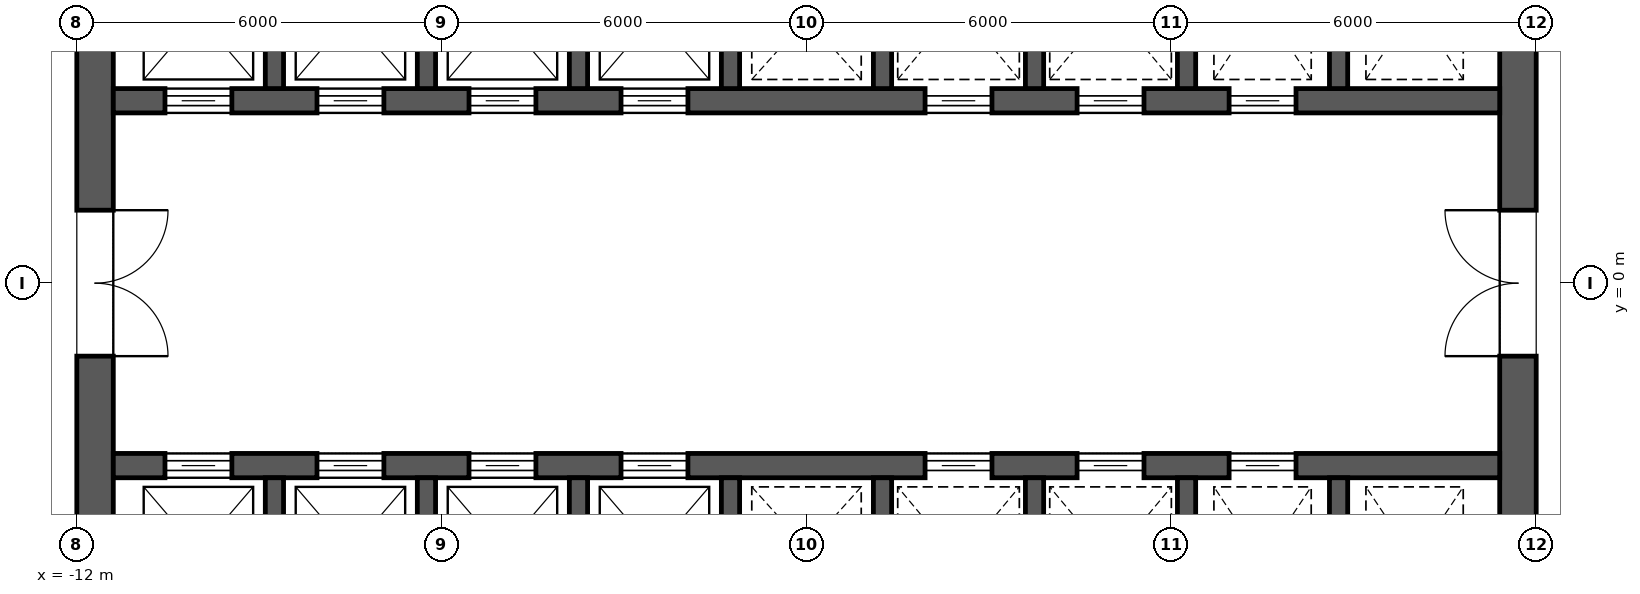
"""IFC4 building model, lengths in metres.
Left out: names, types, materials, properties, quantities, classifications, styles, units other than length and angle.
Written with IfcOpenShell. Run it as: python <this file> out.ifc"""

import sys

from ifc_helpers import new_model, si_unit, direction, frame, frame_2d, origin, place, context, subcontext, project, spatial, rectangle, extrude, element, fill, save


model = new_model("IFC4")
c1 = context("Model", 3, precision=1e-05, world=origin(), true_north=direction((0.0, 1.0)))
c2 = subcontext(c1, "Body", "Model", "MODEL_VIEW")
j1 = project(units=[si_unit("LENGTHUNIT", "METRE"), si_unit("PLANEANGLEUNIT", "RADIAN")], contexts=[c1])
p1 = place(None, origin())
s1 = spatial("IfcSite", under=j1, at=p1, CompositionType="ELEMENT")
p2 = place(p1, origin())
s2 = spatial("IfcBuilding", under=s1, at=p2, CompositionType="ELEMENT")
p3 = place(p2, frame((0.0, 0.0, 167.5)))
s3 = spatial("IfcBuildingStorey", under=s2, at=p3, CompositionType="ELEMENT", Elevation=167.5)
p4 = place(p3, frame((11.7, -11.4, 0.0), z_axis=(0.0, 0.0, 1.0), x_axis=(0.0, 1.0, 0.0)))
e1 = element("IfcWall", 1, at=p4, inside=s3, PredefinedType="SHEAR", context=c2, shape_type="SweptSolid", body=[
    extrude(rectangle(XDim=22.8, YDim=0.6, at=frame_2d((11.4, 0.0))), origin(), (0.0, 0.0, 1.0), 6.0),
])
p5 = place(p4, frame((10.2, 0.0, 0.0)))
e2 = element("IfcOpeningElement", 2, at=p5, cuts=e1, PredefinedType="OPENING", context=c2, shape_type="SweptSolid", body=[
    extrude(rectangle(XDim=2.4, YDim=2.1, at=frame_2d((1.2, 1.05))), frame((0.0, 0.312, 0.0), z_axis=(0.0, -1.0, 0.0), x_axis=(1.0, 0.0, 0.0)), (0.0, 0.0, 1.0), 0.624),
])
p6 = place(p4, frame((19.5, 0.0, 0.0)))
e3 = element("IfcOpeningElement", 3, at=p6, cuts=e1, PredefinedType="OPENING", context=c2, shape_type="SweptSolid", body=[
    extrude(rectangle(XDim=1.2, YDim=2.1, at=frame_2d((0.6, 1.05))), frame((0.0, 0.312, 0.0), z_axis=(0.0, -1.0, 0.0), x_axis=(1.0, 0.0, 0.0)), (0.0, 0.0, 1.0), 0.624),
])
p7 = place(p4, frame((2.1, 0.0, 0.0)))
e4 = element("IfcOpeningElement", 4, at=p7, cuts=e1, PredefinedType="OPENING", context=c2, shape_type="SweptSolid", body=[
    extrude(rectangle(XDim=1.2, YDim=2.1, at=frame_2d((0.6, 1.05))), frame((0.0, 0.312, 0.0), z_axis=(0.0, -1.0, 0.0), x_axis=(1.0, 0.0, 0.0)), (0.0, 0.0, 1.0), 0.624),
])
p8 = place(p3, frame((-11.7, -11.4, 0.0), z_axis=(0.0, 0.0, 1.0), x_axis=(0.0, 1.0, 0.0)))
e5 = element("IfcWall", 5, at=p8, inside=s3, PredefinedType="SHEAR", context=c2, shape_type="SweptSolid", body=[
    extrude(rectangle(XDim=22.8, YDim=0.6, at=frame_2d((11.4, 0.0))), origin(), (0.0, 0.0, 1.0), 6.0),
])
p9 = place(p8, frame((10.2, 0.0, 0.0)))
e6 = element("IfcOpeningElement", 6, at=p9, cuts=e5, PredefinedType="OPENING", context=c2, shape_type="SweptSolid", body=[
    extrude(rectangle(XDim=2.4, YDim=2.1, at=frame_2d((1.2, 1.05))), frame((0.0, 0.312, 0.0), z_axis=(0.0, -1.0, 0.0), x_axis=(1.0, 0.0, 0.0)), (0.0, 0.0, 1.0), 0.624),
])
p10 = place(p8, frame((18.925, 0.0, 0.0)))
e7 = element("IfcOpeningElement", 7, at=p10, cuts=e5, PredefinedType="OPENING", context=c2, shape_type="SweptSolid", body=[
    extrude(rectangle(XDim=1.2, YDim=2.1, at=frame_2d((0.6, 1.05))), frame((0.0, 0.312, 0.0), z_axis=(0.0, -1.0, 0.0), x_axis=(1.0, 0.0, 0.0)), (0.0, 0.0, 1.0), 0.624),
])
p11 = place(p8, frame((2.675, 0.0, 0.0)))
e8 = element("IfcOpeningElement", 8, at=p11, cuts=e5, PredefinedType="OPENING", context=c2, shape_type="SweptSolid", body=[
    extrude(rectangle(XDim=1.2, YDim=2.1, at=frame_2d((0.6, 1.05))), frame((0.0, 0.312, 0.0), z_axis=(0.0, -1.0, 0.0), x_axis=(1.0, 0.0, 0.0)), (0.0, 0.0, 1.0), 0.624),
])
p12 = place(p3, frame((-11.4, 3.0, 0.0), z_axis=(0.0, 0.0, 1.0), x_axis=(1.0, 0.0, 0.0)))
e9 = element("IfcWall", 9, at=p12, inside=s3, PredefinedType="SHEAR", context=c2, shape_type="SweptSolid", body=[
    extrude(rectangle(XDim=22.8, YDim=0.4, at=frame_2d((11.4, 0.0))), origin(), (0.0, 0.0, 1.0), 6.0),
])
p13 = place(p12, frame((0.85, 0.0, 0.0)))
e10 = element("IfcOpeningElement", 10, at=p13, cuts=e9, PredefinedType="OPENING", context=c2, shape_type="SweptSolid", body=[
    extrude(rectangle(XDim=1.1, YDim=2.1, at=frame_2d((0.55, 1.05))), frame((0.0, 0.212, 0.0), z_axis=(0.0, -1.0, 0.0), x_axis=(1.0, 0.0, 0.0)), (0.0, 0.0, 1.0), 0.424),
])
p14 = place(p12, frame((3.35, 0.0, 0.0)))
e11 = element("IfcOpeningElement", 11, at=p14, cuts=e9, PredefinedType="OPENING", context=c2, shape_type="SweptSolid", body=[
    extrude(rectangle(XDim=1.1, YDim=2.1, at=frame_2d((0.55, 1.05))), frame((0.0, 0.212, 0.0), z_axis=(0.0, -1.0, 0.0), x_axis=(1.0, 0.0, 0.0)), (0.0, 0.0, 1.0), 0.424),
])
p15 = place(p12, frame((5.85, 0.0, 0.0)))
e12 = element("IfcOpeningElement", 12, at=p15, cuts=e9, PredefinedType="OPENING", context=c2, shape_type="SweptSolid", body=[
    extrude(rectangle(XDim=1.1, YDim=2.1, at=frame_2d((0.55, 1.05))), frame((0.0, 0.212, 0.0), z_axis=(0.0, -1.0, 0.0), x_axis=(1.0, 0.0, 0.0)), (0.0, 0.0, 1.0), 0.424),
])
p16 = place(p12, frame((8.35, 0.0, 0.0)))
e13 = element("IfcOpeningElement", 13, at=p16, cuts=e9, PredefinedType="OPENING", context=c2, shape_type="SweptSolid", body=[
    extrude(rectangle(XDim=1.1, YDim=2.1, at=frame_2d((0.55, 1.05))), frame((0.0, 0.212, 0.0), z_axis=(0.0, -1.0, 0.0), x_axis=(1.0, 0.0, 0.0)), (0.0, 0.0, 1.0), 0.424),
])
p17 = place(p12, frame((13.35, 0.0, 0.0)))
e14 = element("IfcOpeningElement", 14, at=p17, cuts=e9, PredefinedType="OPENING", context=c2, shape_type="SweptSolid", body=[
    extrude(rectangle(XDim=1.1, YDim=2.1, at=frame_2d((0.55, 1.05))), frame((0.0, 0.212, 0.0), z_axis=(0.0, -1.0, 0.0), x_axis=(1.0, 0.0, 0.0)), (0.0, 0.0, 1.0), 0.424),
])
p18 = place(p12, frame((15.85, 0.0, 0.0)))
e15 = element("IfcOpeningElement", 15, at=p18, cuts=e9, PredefinedType="OPENING", context=c2, shape_type="SweptSolid", body=[
    extrude(rectangle(XDim=1.1, YDim=2.1, at=frame_2d((0.55, 1.05))), frame((0.0, 0.212, 0.0), z_axis=(0.0, -1.0, 0.0), x_axis=(1.0, 0.0, 0.0)), (0.0, 0.0, 1.0), 0.424),
])
p19 = place(p12, frame((18.35, 0.0, 0.0)))
e16 = element("IfcOpeningElement", 16, at=p19, cuts=e9, PredefinedType="OPENING", context=c2, shape_type="SweptSolid", body=[
    extrude(rectangle(XDim=1.1, YDim=2.1, at=frame_2d((0.55, 1.05))), frame((0.0, 0.212, 0.0), z_axis=(0.0, -1.0, 0.0), x_axis=(1.0, 0.0, 0.0)), (0.0, 0.0, 1.0), 0.424),
])
for number, where, z_axis, x_axis in (
    (17, (-8.75, 3.2, 0.0), (0.0, 0.0, 1.0), (0.0, 1.0, 0.0)),
    (18, (-6.25, 3.2, 0.0), (0.0, 0.0, 1.0), (0.0, 1.0, 0.0)),
    (19, (-3.75, 3.2, 0.0), (0.0, 0.0, 1.0), (0.0, 1.0, 0.0)),
    (20, (-1.25, 3.2, 0.0), (0.0, 0.0, 1.0), (0.0, 1.0, 0.0)),
    (21, (1.25, 3.2, 0.0), (0.0, 0.0, 1.0), (0.0, 1.0, 0.0)),
    (22, (3.75, 3.2, 0.0), (0.0, 0.0, 1.0), (0.0, 1.0, 0.0)),
    (23, (6.25, 3.2, 0.0), (0.0, 0.0, 1.0), (0.0, 1.0, 0.0)),
    (24, (8.75, 3.2, 0.0), (0.0, 0.0, 1.0), (0.0, 1.0, 0.0)),
):
    element("IfcWall", number, at=place(p3, frame(where, z_axis=z_axis, x_axis=x_axis)), inside=s3, PredefinedType="SHEAR", context=c2, shape_type="SweptSolid", body=[
        extrude(rectangle(XDim=2.9, YDim=0.3, at=frame_2d((1.45, 0.0))), origin(), (0.0, 0.0, 1.0), 6.0),
    ])
p20 = place(p3, frame((-11.4, -3.0, 0.0), z_axis=(0.0, 0.0, 1.0), x_axis=(1.0, 0.0, 0.0)))
e25 = element("IfcWall", 25, at=p20, inside=s3, PredefinedType="SHEAR", context=c2, shape_type="SweptSolid", body=[
    extrude(rectangle(XDim=22.8, YDim=0.4, at=frame_2d((11.4, 0.0))), origin(), (0.0, 0.0, 1.0), 6.0),
])
p21 = place(p20, frame((0.85, 0.0, 0.0)))
e26 = element("IfcOpeningElement", 26, at=p21, cuts=e25, PredefinedType="OPENING", context=c2, shape_type="SweptSolid", body=[
    extrude(rectangle(XDim=1.1, YDim=2.1, at=frame_2d((0.55, 1.05))), frame((0.0, 0.212, 0.0), z_axis=(0.0, -1.0, 0.0), x_axis=(1.0, 0.0, 0.0)), (0.0, 0.0, 1.0), 0.424),
])
p22 = place(p20, frame((3.35, 0.0, 0.0)))
e27 = element("IfcOpeningElement", 27, at=p22, cuts=e25, PredefinedType="OPENING", context=c2, shape_type="SweptSolid", body=[
    extrude(rectangle(XDim=1.1, YDim=2.1, at=frame_2d((0.55, 1.05))), frame((0.0, 0.212, 0.0), z_axis=(0.0, -1.0, 0.0), x_axis=(1.0, 0.0, 0.0)), (0.0, 0.0, 1.0), 0.424),
])
p23 = place(p20, frame((5.85, 0.0, 0.0)))
e28 = element("IfcOpeningElement", 28, at=p23, cuts=e25, PredefinedType="OPENING", context=c2, shape_type="SweptSolid", body=[
    extrude(rectangle(XDim=1.1, YDim=2.1, at=frame_2d((0.55, 1.05))), frame((0.0, 0.212, 0.0), z_axis=(0.0, -1.0, 0.0), x_axis=(1.0, 0.0, 0.0)), (0.0, 0.0, 1.0), 0.424),
])
p24 = place(p20, frame((8.35, 0.0, 0.0)))
e29 = element("IfcOpeningElement", 29, at=p24, cuts=e25, PredefinedType="OPENING", context=c2, shape_type="SweptSolid", body=[
    extrude(rectangle(XDim=1.1, YDim=2.1, at=frame_2d((0.55, 1.05))), frame((0.0, 0.212, 0.0), z_axis=(0.0, -1.0, 0.0), x_axis=(1.0, 0.0, 0.0)), (0.0, 0.0, 1.0), 0.424),
])
p25 = place(p20, frame((13.35, 0.0, 0.0)))
e30 = element("IfcOpeningElement", 30, at=p25, cuts=e25, PredefinedType="OPENING", context=c2, shape_type="SweptSolid", body=[
    extrude(rectangle(XDim=1.1, YDim=2.1, at=frame_2d((0.55, 1.05))), frame((0.0, 0.212, 0.0), z_axis=(0.0, -1.0, 0.0), x_axis=(1.0, 0.0, 0.0)), (0.0, 0.0, 1.0), 0.424),
])
p26 = place(p20, frame((15.85, 0.0, 0.0)))
e31 = element("IfcOpeningElement", 31, at=p26, cuts=e25, PredefinedType="OPENING", context=c2, shape_type="SweptSolid", body=[
    extrude(rectangle(XDim=1.1, YDim=2.1, at=frame_2d((0.55, 1.05))), frame((0.0, 0.212, 0.0), z_axis=(0.0, -1.0, 0.0), x_axis=(1.0, 0.0, 0.0)), (0.0, 0.0, 1.0), 0.424),
])
p27 = place(p20, frame((18.35, 0.0, 0.0)))
e32 = element("IfcOpeningElement", 32, at=p27, cuts=e25, PredefinedType="OPENING", context=c2, shape_type="SweptSolid", body=[
    extrude(rectangle(XDim=1.1, YDim=2.1, at=frame_2d((0.55, 1.05))), frame((0.0, 0.212, 0.0), z_axis=(0.0, -1.0, 0.0), x_axis=(1.0, 0.0, 0.0)), (0.0, 0.0, 1.0), 0.424),
])
for number, where, z_axis, x_axis in (
    (33, (-8.75, -6.1, 0.0), (0.0, 0.0, 1.0), (0.0, 1.0, 0.0)),
    (34, (-6.25, -6.1, 0.0), (0.0, 0.0, 1.0), (0.0, 1.0, 0.0)),
    (35, (-3.75, -6.1, 0.0), (0.0, 0.0, 1.0), (0.0, 1.0, 0.0)),
    (36, (-1.25, -6.1, 0.0), (0.0, 0.0, 1.0), (0.0, 1.0, 0.0)),
    (37, (1.25, -6.1, 0.0), (0.0, 0.0, 1.0), (0.0, 1.0, 0.0)),
    (38, (3.75, -6.1, 0.0), (0.0, 0.0, 1.0), (0.0, 1.0, 0.0)),
    (39, (6.25, -6.1, 0.0), (0.0, 0.0, 1.0), (0.0, 1.0, 0.0)),
    (40, (8.75, -6.1, 0.0), (0.0, 0.0, 1.0), (0.0, 1.0, 0.0)),
):
    element("IfcWall", number, at=place(p3, frame(where, z_axis=z_axis, x_axis=x_axis)), inside=s3, PredefinedType="SHEAR", context=c2, shape_type="SweptSolid", body=[
        extrude(rectangle(XDim=2.9, YDim=0.3, at=frame_2d((1.45, 0.0))), origin(), (0.0, 0.0, 1.0), 6.0),
    ])
p28 = place(p13, origin())
e41 = element("IfcDoor", 41, at=p28, inside=s3, OperationType="SLIDING_TO_LEFT", PredefinedType="DOOR", context=c2, shape_type="SweptSolid", body=[
    extrude(rectangle(XDim=1.1, YDim=2.1, at=frame_2d((0.55, 1.05))), frame((0.0, 0.025, 0.0), z_axis=(0.0, -1.0, 0.0), x_axis=(1.0, 0.0, 0.0)), (0.0, 0.0, 1.0), 0.05),
])
fill(e10, e41)
p29 = place(p14, origin())
e42 = element("IfcDoor", 42, at=p29, inside=s3, OperationType="SLIDING_TO_LEFT", PredefinedType="DOOR", context=c2, shape_type="SweptSolid", body=[
    extrude(rectangle(XDim=1.1, YDim=2.1, at=frame_2d((0.55, 1.05))), frame((0.0, 0.025, 0.0), z_axis=(0.0, -1.0, 0.0), x_axis=(1.0, 0.0, 0.0)), (0.0, 0.0, 1.0), 0.05),
])
fill(e11, e42)
p30 = place(p21, origin())
e43 = element("IfcDoor", 43, at=p30, inside=s3, OperationType="SLIDING_TO_LEFT", PredefinedType="DOOR", context=c2, shape_type="SweptSolid", body=[
    extrude(rectangle(XDim=1.1, YDim=2.1, at=frame_2d((0.55, 1.05))), frame((0.0, 0.025, 0.0), z_axis=(0.0, -1.0, 0.0), x_axis=(1.0, 0.0, 0.0)), (0.0, 0.0, 1.0), 0.05),
])
fill(e26, e43)
p31 = place(p22, origin())
e44 = element("IfcDoor", 44, at=p31, inside=s3, OperationType="SLIDING_TO_LEFT", PredefinedType="DOOR", context=c2, shape_type="SweptSolid", body=[
    extrude(rectangle(XDim=1.1, YDim=2.1, at=frame_2d((0.55, 1.05))), frame((0.0, 0.025, 0.0), z_axis=(0.0, -1.0, 0.0), x_axis=(1.0, 0.0, 0.0)), (0.0, 0.0, 1.0), 0.05),
])
fill(e27, e44)
p32 = place(p15, origin())
e45 = element("IfcDoor", 45, at=p32, inside=s3, OperationType="SLIDING_TO_LEFT", PredefinedType="DOOR", context=c2, shape_type="SweptSolid", body=[
    extrude(rectangle(XDim=1.1, YDim=2.1, at=frame_2d((0.55, 1.05))), frame((0.0, 0.025, 0.0), z_axis=(0.0, -1.0, 0.0), x_axis=(1.0, 0.0, 0.0)), (0.0, 0.0, 1.0), 0.05),
])
fill(e12, e45)
p33 = place(p16, origin())
e46 = element("IfcDoor", 46, at=p33, inside=s3, OperationType="SLIDING_TO_LEFT", PredefinedType="DOOR", context=c2, shape_type="SweptSolid", body=[
    extrude(rectangle(XDim=1.1, YDim=2.1, at=frame_2d((0.55, 1.05))), frame((0.0, 0.025, 0.0), z_axis=(0.0, -1.0, 0.0), x_axis=(1.0, 0.0, 0.0)), (0.0, 0.0, 1.0), 0.05),
])
fill(e13, e46)
p34 = place(p23, origin())
e47 = element("IfcDoor", 47, at=p34, inside=s3, OperationType="SLIDING_TO_LEFT", PredefinedType="DOOR", context=c2, shape_type="SweptSolid", body=[
    extrude(rectangle(XDim=1.1, YDim=2.1, at=frame_2d((0.55, 1.05))), frame((0.0, 0.025, 0.0), z_axis=(0.0, -1.0, 0.0), x_axis=(1.0, 0.0, 0.0)), (0.0, 0.0, 1.0), 0.05),
])
fill(e28, e47)
p35 = place(p24, origin())
e48 = element("IfcDoor", 48, at=p35, inside=s3, OperationType="SLIDING_TO_LEFT", PredefinedType="DOOR", context=c2, shape_type="SweptSolid", body=[
    extrude(rectangle(XDim=1.1, YDim=2.1, at=frame_2d((0.55, 1.05))), frame((0.0, 0.025, 0.0), z_axis=(0.0, -1.0, 0.0), x_axis=(1.0, 0.0, 0.0)), (0.0, 0.0, 1.0), 0.05),
])
fill(e29, e48)
p36 = place(p17, origin())
e49 = element("IfcDoor", 49, at=p36, inside=s3, OperationType="SLIDING_TO_LEFT", PredefinedType="DOOR", context=c2, shape_type="SweptSolid", body=[
    extrude(rectangle(XDim=1.1, YDim=2.1, at=frame_2d((0.55, 1.05))), frame((0.0, 0.025, 0.0), z_axis=(0.0, -1.0, 0.0), x_axis=(1.0, 0.0, 0.0)), (0.0, 0.0, 1.0), 0.05),
])
fill(e14, e49)
p37 = place(p18, origin())
e50 = element("IfcDoor", 50, at=p37, inside=s3, OperationType="SLIDING_TO_LEFT", PredefinedType="DOOR", context=c2, shape_type="SweptSolid", body=[
    extrude(rectangle(XDim=1.1, YDim=2.1, at=frame_2d((0.55, 1.05))), frame((0.0, 0.025, 0.0), z_axis=(0.0, -1.0, 0.0), x_axis=(1.0, 0.0, 0.0)), (0.0, 0.0, 1.0), 0.05),
])
fill(e15, e50)
p38 = place(p25, origin())
e51 = element("IfcDoor", 51, at=p38, inside=s3, OperationType="SLIDING_TO_LEFT", PredefinedType="DOOR", context=c2, shape_type="SweptSolid", body=[
    extrude(rectangle(XDim=1.1, YDim=2.1, at=frame_2d((0.55, 1.05))), frame((0.0, 0.025, 0.0), z_axis=(0.0, -1.0, 0.0), x_axis=(1.0, 0.0, 0.0)), (0.0, 0.0, 1.0), 0.05),
])
fill(e30, e51)
p39 = place(p26, origin())
e52 = element("IfcDoor", 52, at=p39, inside=s3, OperationType="SLIDING_TO_LEFT", PredefinedType="DOOR", context=c2, shape_type="SweptSolid", body=[
    extrude(rectangle(XDim=1.1, YDim=2.1, at=frame_2d((0.55, 1.05))), frame((0.0, 0.025, 0.0), z_axis=(0.0, -1.0, 0.0), x_axis=(1.0, 0.0, 0.0)), (0.0, 0.0, 1.0), 0.05),
])
fill(e31, e52)
p40 = place(p19, origin())
e53 = element("IfcDoor", 53, at=p40, inside=s3, OperationType="SLIDING_TO_LEFT", PredefinedType="DOOR", context=c2, shape_type="SweptSolid", body=[
    extrude(rectangle(XDim=1.1, YDim=2.1, at=frame_2d((0.55, 1.05))), frame((0.0, 0.025, 0.0), z_axis=(0.0, -1.0, 0.0), x_axis=(1.0, 0.0, 0.0)), (0.0, 0.0, 1.0), 0.05),
])
fill(e16, e53)
p41 = place(p27, origin())
e54 = element("IfcDoor", 54, at=p41, inside=s3, OperationType="SLIDING_TO_LEFT", PredefinedType="DOOR", context=c2, shape_type="SweptSolid", body=[
    extrude(rectangle(XDim=1.1, YDim=2.1, at=frame_2d((0.55, 1.05))), frame((0.0, 0.025, 0.0), z_axis=(0.0, -1.0, 0.0), x_axis=(1.0, 0.0, 0.0)), (0.0, 0.0, 1.0), 0.05),
])
fill(e32, e54)
p42 = place(p9, frame((2.4, 0.0, 0.0), z_axis=(0.0, 0.0, 1.0), x_axis=(-1.0, 0.0, 0.0)))
e55 = element("IfcDoor", 55, at=p42, inside=s3, OperationType="DOUBLE_DOOR_SINGLE_SWING", PredefinedType="DOOR", context=c2, shape_type="SweptSolid", body=[
    extrude(rectangle(XDim=2.4, YDim=2.1, at=frame_2d((1.2, 1.05))), frame((0.0, 0.025, 0.0), z_axis=(0.0, -1.0, 0.0), x_axis=(1.0, 0.0, 0.0)), (0.0, 0.0, 1.0), 0.05),
])
fill(e6, e55)
p43 = place(p5, origin())
e56 = element("IfcDoor", 56, at=p43, inside=s3, OperationType="DOUBLE_DOOR_SINGLE_SWING", PredefinedType="DOOR", context=c2, shape_type="SweptSolid", body=[
    extrude(rectangle(XDim=2.4, YDim=2.1, at=frame_2d((1.2, 1.05))), frame((0.0, 0.025, 0.0), z_axis=(0.0, -1.0, 0.0), x_axis=(1.0, 0.0, 0.0)), (0.0, 0.0, 1.0), 0.05),
])
fill(e2, e56)
save(model, sys.argv[1])
